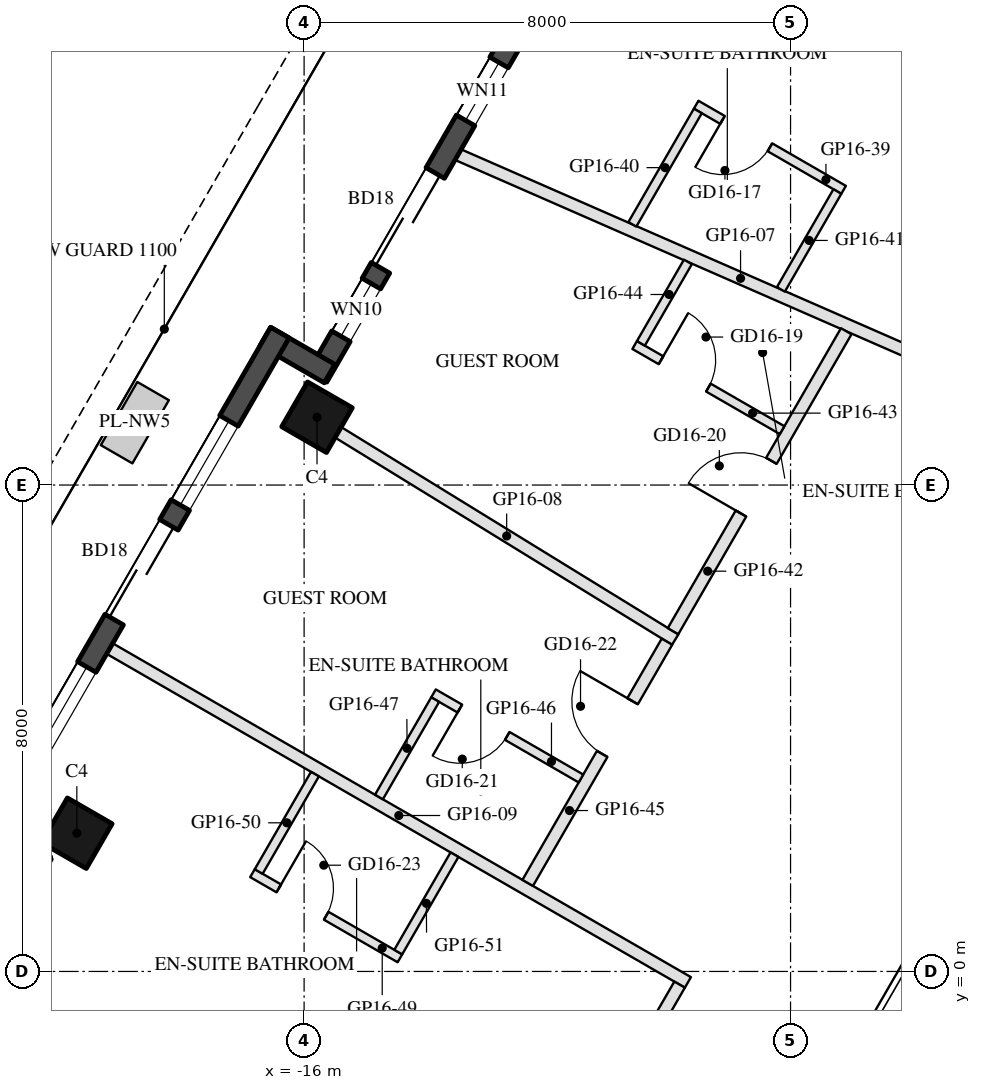
"""IFC4 building model, lengths in metres.
Left out: names, types, materials, properties, quantities, classifications, styles, units other than length and angle.
Written with IfcOpenShell. Run it as: python <this file> out.ifc"""

import sys

from ifc_helpers import new_model, si_unit, direction, frame, frame_2d, origin, origin_2d, place, context, subcontext, project, spatial, rectangle, hollow_rectangle, extrude, element, fill, save


model = new_model("IFC4")
c1 = context("Model", 3, precision=1e-05, world=origin(), true_north=direction((0.0, 1.0)))
c2 = subcontext(c1, "Body", "Model", "MODEL_VIEW")
j1 = project(units=[si_unit("LENGTHUNIT", "METRE"), si_unit("PLANEANGLEUNIT", "RADIAN")], contexts=[c1])
p1 = place(None, origin())
s1 = spatial("IfcSite", under=j1, at=p1, CompositionType="ELEMENT")
p2 = place(p1, origin())
s2 = spatial("IfcBuilding", under=s1, at=p2, CompositionType="ELEMENT")
p3 = place(p2, frame((0.0, 0.0, 176.2)))
s3 = spatial("IfcBuildingStorey", under=s2, at=p3, CompositionType="ELEMENT", Elevation=176.2)
for number, where, z_axis, x_axis in (
    (1, (-15.788, 9.115, 0.0), (0.0, 0.0, 1.0), (0.5, 0.866, 0.0)),
    (2, (-19.738, 2.273, 0.0), (0.0, 0.0, 1.0), (0.5, 0.866, 0.0)),
):
    element("IfcColumn", number, at=place(p3, frame(where, z_axis=z_axis, x_axis=x_axis)), inside=s3, PredefinedType="COLUMN", context=c2, shape_type="SweptSolid", body=[
        extrude(hollow_rectangle(XDim=0.85, YDim=0.85, WallThickness=0.04, at=origin_2d()), origin(), (0.0, 0.0, 1.0), 3.7),
    ])
p4 = place(p3, frame((-12.409, 15.617, 0.0), z_axis=(0.0, 0.0, 1.0), x_axis=(-0.500003597184, -0.866023326939, 0.0)))
e3 = element("IfcWall", 3, at=p4, inside=s3, PredefinedType="SOLIDWALL", context=c2, shape_type="SweptSolid", body=[
    extrude(rectangle(XDim=6.74, YDim=0.35, at=frame_2d((3.37, 0.0))), origin(), (0.0, 0.0, 1.0), 3.55),
])
p5 = place(p4, frame((0.77, 0.0, 0.3)))
e4 = element("IfcOpeningElement", 4, at=p5, cuts=e3, PredefinedType="OPENING", context=c2, shape_type="SweptSolid", body=[
    extrude(rectangle(XDim=1.1, YDim=2.65, at=frame_2d((0.55, 1.325))), frame((0.0, 0.185, 0.0), z_axis=(0.0, -1.0, 0.0), x_axis=(1.0, 0.0, 0.0)), (0.0, 0.0, 1.0), 0.37),
])
p6 = place(p4, frame((2.87, 0.0, 0.0)))
e5 = element("IfcOpeningElement", 5, at=p6, cuts=e3, PredefinedType="OPENING", context=c2, shape_type="SweptSolid", body=[
    extrude(rectangle(XDim=1.8, YDim=2.4, at=frame_2d((0.9, 1.2))), frame((0.0, 0.185, 0.0), z_axis=(0.0, -1.0, 0.0), x_axis=(1.0, 0.0, 0.0)), (0.0, 0.0, 1.0), 0.37),
])
p7 = place(p4, frame((4.97, 0.0, 0.3)))
e6 = element("IfcOpeningElement", 6, at=p7, cuts=e3, PredefinedType="OPENING", context=c2, shape_type="SweptSolid", body=[
    extrude(rectangle(XDim=1.0, YDim=2.65, at=frame_2d((0.5, 1.325))), frame((0.0, 0.185, 0.0), z_axis=(0.0, -1.0, 0.0), x_axis=(1.0, 0.0, 0.0)), (0.0, 0.0, 1.0), 0.37),
])
p8 = place(p3, frame((-15.581, 9.833, 0.0), z_axis=(0.0, 0.0, 1.0), x_axis=(-0.866055662726, 0.499947586314, 0.0)))
e7 = element("IfcWall", 7, at=p8, inside=s3, PredefinedType="SOLIDWALL", context=c2, shape_type="SweptSolid", body=[
    extrude(rectangle(XDim=1.22, YDim=0.35, at=frame_2d((0.61, 0.0))), origin(), (0.0, 0.0, 1.0), 3.55),
])
p9 = place(p3, frame((-16.398, 10.507, 0.0), z_axis=(0.0, 0.0, 1.0), x_axis=(-0.499999142773, -0.866025898704, 0.0)))
e8 = element("IfcWall", 8, at=p9, inside=s3, PredefinedType="SOLIDWALL", context=c2, shape_type="SweptSolid", body=[
    extrude(rectangle(XDim=9.7, YDim=0.35, at=frame_2d((4.85, 0.0))), origin(), (0.0, 0.0, 1.0), 3.55),
])
p10 = place(p9, frame((3.65, 0.0, 0.0)))
e9 = element("IfcOpeningElement", 9, at=p10, cuts=e8, PredefinedType="OPENING", context=c2, shape_type="SweptSolid", body=[
    extrude(rectangle(XDim=1.8, YDim=2.4, at=frame_2d((0.9, 1.2))), frame((0.0, 0.185, 0.0), z_axis=(0.0, -1.0, 0.0), x_axis=(1.0, 0.0, 0.0)), (0.0, 0.0, 1.0), 0.37),
])
p11 = place(p9, frame((1.675, 0.0, 0.3)))
e10 = element("IfcOpeningElement", 10, at=p11, cuts=e8, PredefinedType="OPENING", context=c2, shape_type="SweptSolid", body=[
    extrude(rectangle(XDim=1.6, YDim=2.65, at=frame_2d((0.8, 1.325))), frame((0.0, 0.185, 0.0), z_axis=(0.0, -1.0, 0.0), x_axis=(1.0, 0.0, 0.0)), (0.0, 0.0, 1.0), 0.37),
])
p12 = place(p9, frame((6.35, 0.0, 0.3)))
e11 = element("IfcOpeningElement", 11, at=p12, cuts=e8, PredefinedType="OPENING", context=c2, shape_type="SweptSolid", body=[
    extrude(rectangle(XDim=1.6, YDim=2.65, at=frame_2d((0.8, 1.325))), frame((0.0, 0.185, 0.0), z_axis=(0.0, -1.0, 0.0), x_axis=(1.0, 0.0, 0.0)), (0.0, 0.0, 1.0), 0.37),
])
p13 = place(p3, frame((-13.467, 13.434, 0.0), z_axis=(0.0, 0.0, 1.0), x_axis=(0.916026348045, -0.401118099426, 0.0)))
e12 = element("IfcWall", 12, at=p13, inside=s3, PredefinedType="PARTITIONING", context=c2, shape_type="SweptSolid", body=[
    extrude(rectangle(XDim=10.142, YDim=0.2, at=frame_2d((5.071, 0.0))), origin(), (0.0, 0.0, 1.0), 3.06),
])
p14 = place(p3, frame((-15.44, 8.867, 0.0), z_axis=(0.0, 0.0, 1.0), x_axis=(0.851787104886, -0.523888087237, 0.0)))
e13 = element("IfcWall", 13, at=p14, inside=s3, PredefinedType="PARTITIONING", context=c2, shape_type="SweptSolid", body=[
    extrude(rectangle(XDim=6.508, YDim=0.2, at=frame_2d((3.254, 0.0))), origin(), (0.0, 0.0, 1.0), 2.95),
])
p15 = place(p3, frame((-19.197, 5.31, 0.0), z_axis=(0.0, 0.0, 1.0), x_axis=(0.866027479907, -0.499996404033, 0.0)))
e14 = element("IfcWall", 14, at=p15, inside=s3, PredefinedType="PARTITIONING", context=c2, shape_type="SweptSolid", body=[
    extrude(rectangle(XDim=10.98, YDim=0.2, at=frame_2d((5.49, 0.0))), origin(), (0.0, 0.0, 1.0), 3.06),
])
p16 = place(p3, frame((-7.127, 12.855, 0.0), z_axis=(0.0, 0.0, 1.0), x_axis=(-0.866018616679, 0.500011755427, 0.0)))
e15 = element("IfcWall", 15, at=p16, inside=s3, PredefinedType="PARTITIONING", context=c2, shape_type="SweptSolid", body=[
    extrude(rectangle(XDim=2.8, YDim=0.15, at=frame_2d((1.4, 0.0))), origin(), (0.0, 0.0, 1.0), 3.55),
])
p17 = place(p16, frame((1.4, 0.0, 0.0)))
e16 = element("IfcOpeningElement", 16, at=p17, cuts=e15, PredefinedType="OPENING", context=c2, shape_type="SweptSolid", body=[
    extrude(rectangle(XDim=0.9, YDim=2.1, at=frame_2d((0.45, 1.05))), frame((0.0, 0.085, 0.0), z_axis=(0.0, -1.0, 0.0), x_axis=(1.0, 0.0, 0.0)), (0.0, 0.0, 1.0), 0.17),
])
p18 = place(p3, frame((-9.525, 14.153, 0.0), z_axis=(0.0, 0.0, 1.0), x_axis=(-0.500016891966, -0.866015650984, 0.0)))
e17 = element("IfcWall", 17, at=p18, inside=s3, PredefinedType="PARTITIONING", context=c2, shape_type="SweptSolid", body=[
    extrude(rectangle(XDim=2.153, YDim=0.15, at=frame_2d((1.077, 0.0))), origin(), (0.0, 0.0, 1.0), 3.55),
])
p19 = place(p3, frame((-7.23, 12.828, 0.0), z_axis=(0.0, 0.0, 1.0), x_axis=(-0.500010545262, -0.866019315389, 0.0)))
e18 = element("IfcWall", 18, at=p19, inside=s3, PredefinedType="PARTITIONING", context=c2, shape_type="SweptSolid", body=[
    extrude(rectangle(XDim=1.858, YDim=0.15, at=frame_2d((0.929, 0.0))), origin(), (0.0, 0.0, 1.0), 3.55),
])
p20 = place(p3, frame((-9.932, 5.597, 0.0), z_axis=(0.0, 0.0, 1.0), x_axis=(0.500006916967, 0.866021410235, 0.0)))
e19 = element("IfcWall", 19, at=p20, inside=s3, PredefinedType="PARTITIONING", context=c2, shape_type="SweptSolid", body=[
    extrude(rectangle(XDim=5.696, YDim=0.2, at=frame_2d((2.848, 0.0))), origin(), (0.0, 0.0, 1.0), 2.95),
])
p21 = place(p20, frame((2.235, 0.0, 0.0)))
e20 = element("IfcOpeningElement", 20, at=p21, cuts=e19, PredefinedType="OPENING", context=c2, shape_type="SweptSolid", body=[
    extrude(rectangle(XDim=1.0, YDim=2.1, at=frame_2d((0.5, 1.05))), frame((0.0, 0.11, 0.0), z_axis=(0.0, -1.0, 0.0), x_axis=(1.0, 0.0, 0.0)), (0.0, 0.0, 1.0), 0.22),
])
p22 = place(p3, frame((-10.564, 10.303, 0.0), z_axis=(0.0, 0.0, 1.0), x_axis=(0.865996816683, -0.500049511043, 0.0)))
e21 = element("IfcWall", 21, at=p22, inside=s3, PredefinedType="PARTITIONING", context=c2, shape_type="SweptSolid", body=[
    extrude(rectangle(XDim=2.8, YDim=0.15, at=frame_2d((1.4, 0.0))), origin(), (0.0, 0.0, 1.0), 3.55),
])
p23 = place(p22, frame((0.5, 0.0, 0.0)))
e22 = element("IfcOpeningElement", 22, at=p23, cuts=e21, PredefinedType="OPENING", context=c2, shape_type="SweptSolid", body=[
    extrude(rectangle(XDim=0.9, YDim=2.1, at=frame_2d((0.45, 1.05))), frame((0.0, 0.085, 0.0), z_axis=(0.0, -1.0, 0.0), x_axis=(1.0, 0.0, 0.0)), (0.0, 0.0, 1.0), 0.17),
])
p24 = place(p3, frame((-9.688, 11.67, 0.0), z_axis=(0.0, 0.0, 1.0), x_axis=(-0.499890974144, -0.866088340742, 0.0)))
e23 = element("IfcWall", 23, at=p24, inside=s3, PredefinedType="PARTITIONING", context=c2, shape_type="SweptSolid", body=[
    extrude(rectangle(XDim=1.547, YDim=0.15, at=frame_2d((0.773, 0.0))), origin(), (0.0, 0.0, 1.0), 2.95),
])
p25 = place(p3, frame((-12.323, 1.457, 0.0), z_axis=(0.0, 0.0, 1.0), x_axis=(0.500008507724, 0.866020491792, 0.0)))
e24 = element("IfcWall", 24, at=p25, inside=s3, PredefinedType="PARTITIONING", context=c2, shape_type="SweptSolid", body=[
    extrude(rectangle(XDim=4.581, YDim=0.2, at=frame_2d((2.29, 0.0))), origin(), (0.0, 0.0, 1.0), 2.95),
])
p26 = place(p25, frame((2.45, 0.0, 0.0)))
e25 = element("IfcOpeningElement", 25, at=p26, cuts=e24, PredefinedType="OPENING", context=c2, shape_type="SweptSolid", body=[
    extrude(rectangle(XDim=1.0, YDim=2.1, at=frame_2d((0.5, 1.05))), frame((0.0, 0.11, 0.0), z_axis=(0.0, -1.0, 0.0), x_axis=(1.0, 0.0, 0.0)), (0.0, 0.0, 1.0), 0.22),
])
p27 = place(p3, frame((-11.447, 3.174, 0.0), z_axis=(0.0, 0.0, 1.0), x_axis=(-0.866034573852, 0.49998411664, 0.0)))
e26 = element("IfcWall", 26, at=p27, inside=s3, PredefinedType="PARTITIONING", context=c2, shape_type="SweptSolid", body=[
    extrude(rectangle(XDim=2.8, YDim=0.15, at=frame_2d((1.4, 0.0))), origin(), (0.0, 0.0, 1.0), 3.55),
])
p28 = place(p27, frame((1.4, 0.0, 0.0)))
e27 = element("IfcOpeningElement", 27, at=p28, cuts=e26, PredefinedType="OPENING", context=c2, shape_type="SweptSolid", body=[
    extrude(rectangle(XDim=0.9, YDim=2.1, at=frame_2d((0.45, 1.05))), frame((0.0, 0.085, 0.0), z_axis=(0.0, -1.0, 0.0), x_axis=(1.0, 0.0, 0.0)), (0.0, 0.0, 1.0), 0.17),
])
p29 = place(p3, frame((-13.844, 4.471, 0.0), z_axis=(0.0, 0.0, 1.0), x_axis=(-0.499985172903, -0.866033964044, 0.0)))
e28 = element("IfcWall", 28, at=p29, inside=s3, PredefinedType="PARTITIONING", context=c2, shape_type="SweptSolid", body=[
    extrude(rectangle(XDim=1.85, YDim=0.15, at=frame_2d((0.925, 0.0))), origin(), (0.0, 0.0, 1.0), 2.95),
])
p30 = place(p3, frame((-12.269, -4.45, 0.0), z_axis=(0.0, 0.0, 1.0), x_axis=(0.500012125002, 0.866018403298, 0.0)))
e29 = element("IfcWall", 29, at=p30, inside=s3, PredefinedType="PARTITIONING", context=c2, shape_type="SweptSolid", body=[
    extrude(rectangle(XDim=4.888, YDim=0.2, at=frame_2d((2.444, 0.0))), origin(), (0.0, 0.0, 1.0), 2.95),
])
p31 = place(p30, frame((1.944, 0.0, 0.0)))
e30 = element("IfcOpeningElement", 30, at=p31, cuts=e29, PredefinedType="OPENING", context=c2, shape_type="SweptSolid", body=[
    extrude(rectangle(XDim=1.0, YDim=2.1, at=frame_2d((0.5, 1.05))), frame((0.0, 0.11, 0.0), z_axis=(0.0, -1.0, 0.0), x_axis=(1.0, 0.0, 0.0)), (0.0, 0.0, 1.0), 0.22),
])
p32 = place(p3, frame((-16.849, 1.616, 0.0), z_axis=(0.0, 0.0, 1.0), x_axis=(0.866056369097, -0.49994636267, 0.0)))
e31 = element("IfcWall", 31, at=p32, inside=s3, PredefinedType="PARTITIONING", context=c2, shape_type="SweptSolid", body=[
    extrude(rectangle(XDim=2.8, YDim=0.15, at=frame_2d((1.4, 0.0))), origin(), (0.0, 0.0, 1.0), 3.55),
])
p33 = place(p32, frame((0.5, 0.0, 0.0)))
e32 = element("IfcOpeningElement", 32, at=p33, cuts=e31, PredefinedType="OPENING", context=c2, shape_type="SweptSolid", body=[
    extrude(rectangle(XDim=0.9, YDim=2.1, at=frame_2d((0.45, 1.05))), frame((0.0, 0.085, 0.0), z_axis=(0.0, -1.0, 0.0), x_axis=(1.0, 0.0, 0.0)), (0.0, 0.0, 1.0), 0.17),
])
for number, where, z_axis, x_axis in (
    (33, (-15.822, 3.246, 0.0), (0.0, 0.0, 1.0), (-0.5, -0.866, 0.0)),
    (34, (-13.527, 1.921, 0.0), (0.0, 0.0, 1.0), (-0.5, -0.866, 0.0)),
):
    element("IfcWall", number, at=place(p3, frame(where, z_axis=z_axis, x_axis=x_axis)), inside=s3, PredefinedType="PARTITIONING", context=c2, shape_type="SweptSolid", body=[
        extrude(rectangle(XDim=1.85, YDim=0.15, at=frame_2d((0.925, 0.0))), origin(), (0.0, 0.0, 1.0), 3.55),
    ])
p34 = place(p5, origin())
e35 = element("IfcWindow", 35, at=p34, inside=s3, PartitioningType="SINGLE_PANEL", PredefinedType="WINDOW", context=c2, shape_type="SweptSolid", body=[
    extrude(rectangle(XDim=1.1, YDim=2.65, at=frame_2d((0.55, 1.325))), frame((0.0, 0.03, 0.0), z_axis=(0.0, -1.0, 0.0), x_axis=(1.0, 0.0, 0.0)), (0.0, 0.0, 1.0), 0.06),
])
fill(e4, e35)
p35 = place(p6, frame((1.8, 0.0, 0.0), z_axis=(0.0, 0.0, 1.0), x_axis=(-1.0, 0.0, 0.0)))
e36 = element("IfcDoor", 36, at=p35, inside=s3, OperationType="SLIDING_TO_LEFT", PredefinedType="DOOR", context=c2, shape_type="SweptSolid", body=[
    extrude(rectangle(XDim=1.8, YDim=2.4, at=frame_2d((0.9, 1.2))), frame((0.0, 0.025, 0.0), z_axis=(0.0, -1.0, 0.0), x_axis=(1.0, 0.0, 0.0)), (0.0, 0.0, 1.0), 0.05),
])
fill(e5, e36)
p36 = place(p7, origin())
e37 = element("IfcWindow", 37, at=p36, inside=s3, PartitioningType="SINGLE_PANEL", PredefinedType="WINDOW", context=c2, shape_type="SweptSolid", body=[
    extrude(rectangle(XDim=1.0, YDim=2.65, at=frame_2d((0.5, 1.325))), frame((0.0, 0.03, 0.0), z_axis=(0.0, -1.0, 0.0), x_axis=(1.0, 0.0, 0.0)), (0.0, 0.0, 1.0), 0.06),
])
fill(e6, e37)
p37 = place(p10, frame((1.8, 0.0, 0.0), z_axis=(0.0, 0.0, 1.0), x_axis=(-1.0, 0.0, 0.0)))
e38 = element("IfcDoor", 38, at=p37, inside=s3, OperationType="SLIDING_TO_LEFT", PredefinedType="DOOR", context=c2, shape_type="SweptSolid", body=[
    extrude(rectangle(XDim=1.8, YDim=2.4, at=frame_2d((0.9, 1.2))), frame((0.0, 0.025, 0.0), z_axis=(0.0, -1.0, 0.0), x_axis=(1.0, 0.0, 0.0)), (0.0, 0.0, 1.0), 0.05),
])
fill(e9, e38)
p38 = place(p11, origin())
e39 = element("IfcWindow", 39, at=p38, inside=s3, PartitioningType="SINGLE_PANEL", PredefinedType="WINDOW", context=c2, shape_type="SweptSolid", body=[
    extrude(rectangle(XDim=1.6, YDim=2.65, at=frame_2d((0.8, 1.325))), frame((0.0, 0.03, 0.0), z_axis=(0.0, -1.0, 0.0), x_axis=(1.0, 0.0, 0.0)), (0.0, 0.0, 1.0), 0.06),
])
fill(e10, e39)
p39 = place(p12, origin())
e40 = element("IfcWindow", 40, at=p39, inside=s3, PartitioningType="SINGLE_PANEL", PredefinedType="WINDOW", context=c2, shape_type="SweptSolid", body=[
    extrude(rectangle(XDim=1.6, YDim=2.65, at=frame_2d((0.8, 1.325))), frame((0.0, 0.03, 0.0), z_axis=(0.0, -1.0, 0.0), x_axis=(1.0, 0.0, 0.0)), (0.0, 0.0, 1.0), 0.06),
])
fill(e11, e40)
p40 = place(p17, origin())
e41 = element("IfcDoor", 41, at=p40, inside=s3, OperationType="SINGLE_SWING_RIGHT", PredefinedType="DOOR", context=c2, shape_type="SweptSolid", body=[
    extrude(rectangle(XDim=0.9, YDim=2.1, at=frame_2d((0.45, 1.05))), frame((0.0, 0.025, 0.0), z_axis=(0.0, -1.0, 0.0), x_axis=(1.0, 0.0, 0.0)), (0.0, 0.0, 1.0), 0.05),
])
fill(e16, e41)
p41 = place(p23, origin())
e42 = element("IfcDoor", 42, at=p41, inside=s3, OperationType="SINGLE_SWING_LEFT", PredefinedType="DOOR", context=c2, shape_type="SweptSolid", body=[
    extrude(rectangle(XDim=0.9, YDim=2.1, at=frame_2d((0.45, 1.05))), frame((0.0, 0.025, 0.0), z_axis=(0.0, -1.0, 0.0), x_axis=(1.0, 0.0, 0.0)), (0.0, 0.0, 1.0), 0.05),
])
fill(e22, e42)
p42 = place(p21, origin())
e43 = element("IfcDoor", 43, at=p42, inside=s3, OperationType="SINGLE_SWING_LEFT", PredefinedType="DOOR", context=c2, shape_type="SweptSolid", body=[
    extrude(rectangle(XDim=1.0, YDim=2.1, at=frame_2d((0.5, 1.05))), frame((0.0, 0.025, 0.0), z_axis=(0.0, -1.0, 0.0), x_axis=(1.0, 0.0, 0.0)), (0.0, 0.0, 1.0), 0.05),
])
fill(e20, e43)
p43 = place(p28, origin())
e44 = element("IfcDoor", 44, at=p43, inside=s3, OperationType="SINGLE_SWING_RIGHT", PredefinedType="DOOR", context=c2, shape_type="SweptSolid", body=[
    extrude(rectangle(XDim=0.9, YDim=2.1, at=frame_2d((0.45, 1.05))), frame((0.0, 0.025, 0.0), z_axis=(0.0, -1.0, 0.0), x_axis=(1.0, 0.0, 0.0)), (0.0, 0.0, 1.0), 0.05),
])
fill(e27, e44)
p44 = place(p26, origin())
e45 = element("IfcDoor", 45, at=p44, inside=s3, OperationType="SINGLE_SWING_RIGHT", PredefinedType="DOOR", context=c2, shape_type="SweptSolid", body=[
    extrude(rectangle(XDim=1.0, YDim=2.1, at=frame_2d((0.5, 1.05))), frame((0.0, 0.025, 0.0), z_axis=(0.0, -1.0, 0.0), x_axis=(1.0, 0.0, 0.0)), (0.0, 0.0, 1.0), 0.05),
])
fill(e25, e45)
p45 = place(p33, origin())
e46 = element("IfcDoor", 46, at=p45, inside=s3, OperationType="SINGLE_SWING_LEFT", PredefinedType="DOOR", context=c2, shape_type="SweptSolid", body=[
    extrude(rectangle(XDim=0.9, YDim=2.1, at=frame_2d((0.45, 1.05))), frame((0.0, 0.025, 0.0), z_axis=(0.0, -1.0, 0.0), x_axis=(1.0, 0.0, 0.0)), (0.0, 0.0, 1.0), 0.05),
])
fill(e32, e46)
save(model, sys.argv[1])
